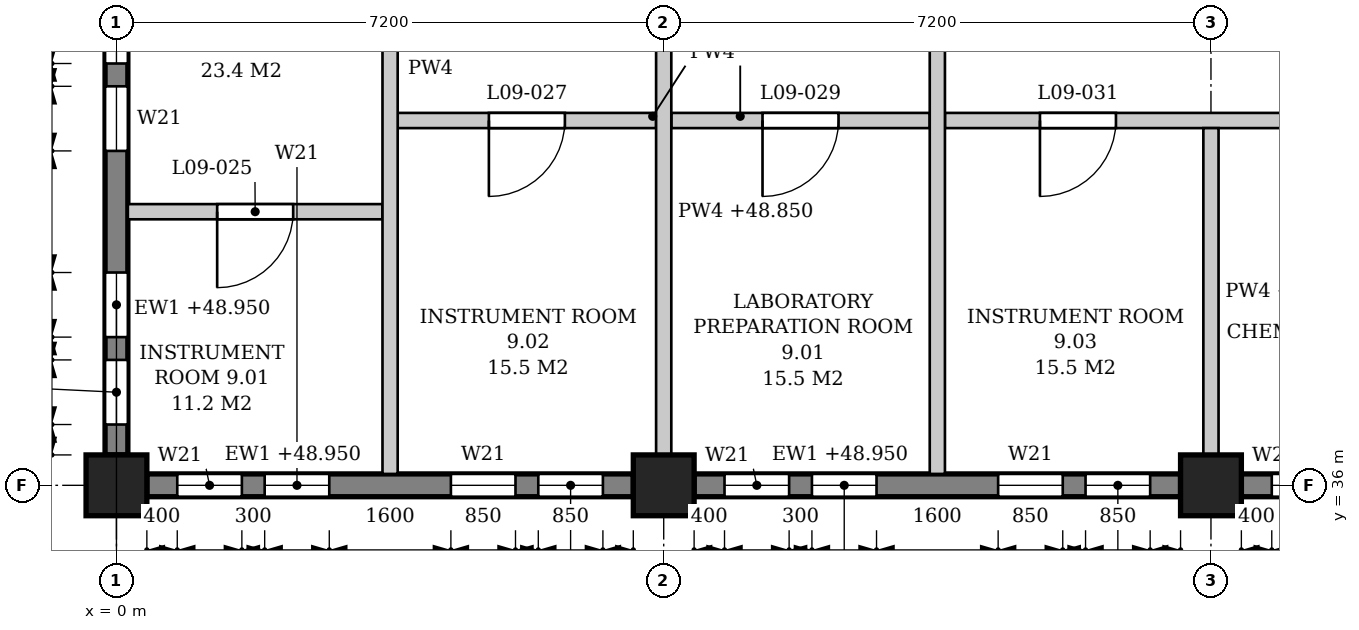
"""IFC4 building model, lengths in metres.
Left out: names, types, materials, properties, quantities, classifications, styles, units other than length and angle.
Written with IfcOpenShell. Run it as: python <this file> out.ifc"""

import sys

from ifc_helpers import new_model, si_unit, direction, frame, frame_2d, origin, origin_2d, place, context, subcontext, project, spatial, polyline, rectangle, outline, extrude, element, fill, save


model = new_model("IFC4")
c1 = context("Model", 3, precision=1e-05, world=origin(), true_north=direction((0.0, 1.0)))
c2 = subcontext(c1, "Body", "Model", "MODEL_VIEW")
j1 = project(units=[si_unit("LENGTHUNIT", "METRE"), si_unit("PLANEANGLEUNIT", "RADIAN")], contexts=[c1])
p1 = place(None, origin())
s1 = spatial("IfcSite", under=j1, at=p1, CompositionType="ELEMENT")
p2 = place(p1, origin())
s2 = spatial("IfcBuilding", under=s1, at=p2, CompositionType="ELEMENT")
p3 = place(p2, frame((0.0, 0.0, 45.3)))
s3 = spatial("IfcBuildingStorey", under=s2, at=p3, CompositionType="ELEMENT", Elevation=45.3)
for number, where, z_axis, x_axis in (
    (1, (0.0, 36.0, 0.0), (0.0, 0.0, 1.0), (1.0, 0.0, 0.0)),
    (2, (7.2, 36.0, 0.0), (0.0, 0.0, 1.0), (1.0, 0.0, 0.0)),
    (3, (14.4, 36.0, 0.0), (0.0, 0.0, 1.0), (1.0, 0.0, 0.0)),
):
    element("IfcColumn", number, at=place(p3, frame(where, z_axis=z_axis, x_axis=x_axis)), inside=s3, PredefinedType="COLUMN", context=c2, shape_type="SweptSolid", body=[
        extrude(rectangle(XDim=0.8, YDim=0.8, at=origin_2d()), origin(), (0.0, 0.0, 1.0), 4.5),
    ])
p4 = place(p3, frame((0.0, 36.4, 0.0), z_axis=(0.0, 0.0, 1.0), x_axis=(0.0, 1.0, 0.0)))
e4 = element("IfcWall", 4, at=p4, inside=s3, PredefinedType="STANDARD", context=c2, shape_type="SweptSolid", body=[
    extrude(rectangle(XDim=6.4, YDim=0.3, at=frame_2d((3.2, 0.0))), origin(), (0.0, 0.0, 1.0), 3.65),
])
p5 = place(p4, frame((0.4, 0.0, 0.9)))
e5 = element("IfcOpeningElement", 5, at=p5, cuts=e4, PredefinedType="OPENING", context=c2, shape_type="SweptSolid", body=[
    extrude(outline(polyline([(0.0, 0.0), (0.85, 0.0), (0.85, 2.25), (0.425, 2.7), (0.0, 2.25), (0.0, 0.0)])), frame((0.0, 0.16, 0.0), z_axis=(0.0, -1.0, 0.0), x_axis=(1.0, 0.0, 0.0)), (0.0, 0.0, 1.0), 0.32),
])
p6 = place(p4, frame((1.55, 0.0, 0.9)))
e6 = element("IfcOpeningElement", 6, at=p6, cuts=e4, PredefinedType="OPENING", context=c2, shape_type="SweptSolid", body=[
    extrude(outline(polyline([(0.0, 0.0), (0.85, 0.0), (0.85, 2.25), (0.425, 2.7), (0.0, 2.25), (0.0, 0.0)])), frame((0.0, 0.16, 0.0), z_axis=(0.0, -1.0, 0.0), x_axis=(1.0, 0.0, 0.0)), (0.0, 0.0, 1.0), 0.32),
])
p7 = place(p4, frame((4.0, 0.0, 0.9)))
e7 = element("IfcOpeningElement", 7, at=p7, cuts=e4, PredefinedType="OPENING", context=c2, shape_type="SweptSolid", body=[
    extrude(outline(polyline([(0.0, 0.0), (0.85, 0.0), (0.85, 2.25), (0.425, 2.7), (0.0, 2.25), (0.0, 0.0)])), frame((0.0, 0.16, 0.0), z_axis=(0.0, -1.0, 0.0), x_axis=(1.0, 0.0, 0.0)), (0.0, 0.0, 1.0), 0.32),
])
p8 = place(p4, frame((5.15, 0.0, 0.9)))
e8 = element("IfcOpeningElement", 8, at=p8, cuts=e4, PredefinedType="OPENING", context=c2, shape_type="SweptSolid", body=[
    extrude(outline(polyline([(0.0, 0.0), (0.85, 0.0), (0.85, 2.25), (0.425, 2.7), (0.0, 2.25), (0.0, 0.0)])), frame((0.0, 0.16, 0.0), z_axis=(0.0, -1.0, 0.0), x_axis=(1.0, 0.0, 0.0)), (0.0, 0.0, 1.0), 0.32),
])
p9 = place(p3, frame((0.4, 36.0, 0.0), z_axis=(0.0, 0.0, 1.0), x_axis=(1.0, 0.0, 0.0)))
e9 = element("IfcWall", 9, at=p9, inside=s3, PredefinedType="STANDARD", context=c2, shape_type="SweptSolid", body=[
    extrude(rectangle(XDim=6.4, YDim=0.3, at=frame_2d((3.2, 0.0))), origin(), (0.0, 0.0, 1.0), 3.65),
])
p10 = place(p9, frame((0.4, 0.0, 0.9)))
e10 = element("IfcOpeningElement", 10, at=p10, cuts=e9, PredefinedType="OPENING", context=c2, shape_type="SweptSolid", body=[
    extrude(outline(polyline([(0.0, 0.0), (0.85, 0.0), (0.85, 2.25), (0.425, 2.7), (0.0, 2.25), (0.0, 0.0)])), frame((0.0, 0.16, 0.0), z_axis=(0.0, -1.0, 0.0), x_axis=(1.0, 0.0, 0.0)), (0.0, 0.0, 1.0), 0.32),
])
p11 = place(p9, frame((1.55, 0.0, 0.9)))
e11 = element("IfcOpeningElement", 11, at=p11, cuts=e9, PredefinedType="OPENING", context=c2, shape_type="SweptSolid", body=[
    extrude(outline(polyline([(0.0, 0.0), (0.85, 0.0), (0.85, 2.25), (0.425, 2.7), (0.0, 2.25), (0.0, 0.0)])), frame((0.0, 0.16, 0.0), z_axis=(0.0, -1.0, 0.0), x_axis=(1.0, 0.0, 0.0)), (0.0, 0.0, 1.0), 0.32),
])
p12 = place(p9, frame((4.0, 0.0, 0.9)))
e12 = element("IfcOpeningElement", 12, at=p12, cuts=e9, PredefinedType="OPENING", context=c2, shape_type="SweptSolid", body=[
    extrude(outline(polyline([(0.0, 0.0), (0.85, 0.0), (0.85, 2.25), (0.425, 2.7), (0.0, 2.25), (0.0, 0.0)])), frame((0.0, 0.16, 0.0), z_axis=(0.0, -1.0, 0.0), x_axis=(1.0, 0.0, 0.0)), (0.0, 0.0, 1.0), 0.32),
])
p13 = place(p9, frame((5.15, 0.0, 0.9)))
e13 = element("IfcOpeningElement", 13, at=p13, cuts=e9, PredefinedType="OPENING", context=c2, shape_type="SweptSolid", body=[
    extrude(outline(polyline([(0.0, 0.0), (0.85, 0.0), (0.85, 2.25), (0.425, 2.7), (0.0, 2.25), (0.0, 0.0)])), frame((0.0, 0.16, 0.0), z_axis=(0.0, -1.0, 0.0), x_axis=(1.0, 0.0, 0.0)), (0.0, 0.0, 1.0), 0.32),
])
p14 = place(p3, frame((7.6, 36.0, 0.0), z_axis=(0.0, 0.0, 1.0), x_axis=(1.0, 0.0, 0.0)))
e14 = element("IfcWall", 14, at=p14, inside=s3, PredefinedType="STANDARD", context=c2, shape_type="SweptSolid", body=[
    extrude(rectangle(XDim=6.4, YDim=0.3, at=frame_2d((3.2, 0.0))), origin(), (0.0, 0.0, 1.0), 3.65),
])
p15 = place(p14, frame((0.4, 0.0, 0.9)))
e15 = element("IfcOpeningElement", 15, at=p15, cuts=e14, PredefinedType="OPENING", context=c2, shape_type="SweptSolid", body=[
    extrude(outline(polyline([(0.0, 0.0), (0.85, 0.0), (0.85, 2.25), (0.425, 2.7), (0.0, 2.25), (0.0, 0.0)])), frame((0.0, 0.16, 0.0), z_axis=(0.0, -1.0, 0.0), x_axis=(1.0, 0.0, 0.0)), (0.0, 0.0, 1.0), 0.32),
])
p16 = place(p14, frame((1.55, 0.0, 0.9)))
e16 = element("IfcOpeningElement", 16, at=p16, cuts=e14, PredefinedType="OPENING", context=c2, shape_type="SweptSolid", body=[
    extrude(outline(polyline([(0.0, 0.0), (0.85, 0.0), (0.85, 2.25), (0.425, 2.7), (0.0, 2.25), (0.0, 0.0)])), frame((0.0, 0.16, 0.0), z_axis=(0.0, -1.0, 0.0), x_axis=(1.0, 0.0, 0.0)), (0.0, 0.0, 1.0), 0.32),
])
p17 = place(p14, frame((4.0, 0.0, 0.9)))
e17 = element("IfcOpeningElement", 17, at=p17, cuts=e14, PredefinedType="OPENING", context=c2, shape_type="SweptSolid", body=[
    extrude(outline(polyline([(0.0, 0.0), (0.85, 0.0), (0.85, 2.25), (0.425, 2.7), (0.0, 2.25), (0.0, 0.0)])), frame((0.0, 0.16, 0.0), z_axis=(0.0, -1.0, 0.0), x_axis=(1.0, 0.0, 0.0)), (0.0, 0.0, 1.0), 0.32),
])
p18 = place(p14, frame((5.15, 0.0, 0.9)))
e18 = element("IfcOpeningElement", 18, at=p18, cuts=e14, PredefinedType="OPENING", context=c2, shape_type="SweptSolid", body=[
    extrude(outline(polyline([(0.0, 0.0), (0.85, 0.0), (0.85, 2.25), (0.425, 2.7), (0.0, 2.25), (0.0, 0.0)])), frame((0.0, 0.16, 0.0), z_axis=(0.0, -1.0, 0.0), x_axis=(1.0, 0.0, 0.0)), (0.0, 0.0, 1.0), 0.32),
])
p19 = place(p3, frame((14.8, 36.0, 0.0), z_axis=(0.0, 0.0, 1.0), x_axis=(1.0, 0.0, 0.0)))
e19 = element("IfcWall", 19, at=p19, inside=s3, PredefinedType="STANDARD", context=c2, shape_type="SweptSolid", body=[
    extrude(rectangle(XDim=6.4, YDim=0.3, at=frame_2d((3.2, 0.0))), origin(), (0.0, 0.0, 1.0), 3.65),
])
p20 = place(p19, frame((0.4, 0.0, 0.9)))
e20 = element("IfcOpeningElement", 20, at=p20, cuts=e19, PredefinedType="OPENING", context=c2, shape_type="SweptSolid", body=[
    extrude(outline(polyline([(0.0, 0.0), (0.85, 0.0), (0.85, 2.25), (0.425, 2.7), (0.0, 2.25), (0.0, 0.0)])), frame((0.0, 0.16, 0.0), z_axis=(0.0, -1.0, 0.0), x_axis=(1.0, 0.0, 0.0)), (0.0, 0.0, 1.0), 0.32),
])
p21 = place(p19, frame((1.55, 0.0, 0.9)))
e21 = element("IfcOpeningElement", 21, at=p21, cuts=e19, PredefinedType="OPENING", context=c2, shape_type="SweptSolid", body=[
    extrude(outline(polyline([(0.0, 0.0), (0.85, 0.0), (0.85, 2.25), (0.425, 2.7), (0.0, 2.25), (0.0, 0.0)])), frame((0.0, 0.16, 0.0), z_axis=(0.0, -1.0, 0.0), x_axis=(1.0, 0.0, 0.0)), (0.0, 0.0, 1.0), 0.32),
])
p22 = place(p19, frame((4.0, 0.0, 0.9)))
e22 = element("IfcOpeningElement", 22, at=p22, cuts=e19, PredefinedType="OPENING", context=c2, shape_type="SweptSolid", body=[
    extrude(outline(polyline([(0.0, 0.0), (0.85, 0.0), (0.85, 2.25), (0.425, 2.7), (0.0, 2.25), (0.0, 0.0)])), frame((0.0, 0.16, 0.0), z_axis=(0.0, -1.0, 0.0), x_axis=(1.0, 0.0, 0.0)), (0.0, 0.0, 1.0), 0.32),
])
p23 = place(p19, frame((5.15, 0.0, 0.9)))
e23 = element("IfcOpeningElement", 23, at=p23, cuts=e19, PredefinedType="OPENING", context=c2, shape_type="SweptSolid", body=[
    extrude(outline(polyline([(0.0, 0.0), (0.85, 0.0), (0.85, 2.25), (0.425, 2.7), (0.0, 2.25), (0.0, 0.0)])), frame((0.0, 0.16, 0.0), z_axis=(0.0, -1.0, 0.0), x_axis=(1.0, 0.0, 0.0)), (0.0, 0.0, 1.0), 0.32),
])
p24 = place(p3, frame((0.15, 39.6, 0.0), z_axis=(0.0, 0.0, 1.0), x_axis=(1.0, 0.0, 0.0)))
e24 = element("IfcWall", 24, at=p24, inside=s3, PredefinedType="PARTITIONING", context=c2, shape_type="SweptSolid", body=[
    extrude(outline(polyline([(0.0, 0.0), (3.35, 0.0), (3.35, 4.25), (0.05, 4.25), (0.05, 3.65), (0.0, 3.65), (0.0, 0.0)])), frame((0.0, 0.1, 0.0), z_axis=(0.0, -1.0, 0.0), x_axis=(1.0, 0.0, 0.0)), (0.0, 0.0, 1.0), 0.2),
])
p25 = place(p24, frame((1.175, 0.0, 0.0)))
e25 = element("IfcOpeningElement", 25, at=p25, cuts=e24, PredefinedType="OPENING", context=c2, shape_type="SweptSolid", body=[
    extrude(rectangle(XDim=1.0, YDim=2.1, at=frame_2d((0.5, 1.05))), frame((0.0, 0.11, 0.0), z_axis=(0.0, -1.0, 0.0), x_axis=(1.0, 0.0, 0.0)), (0.0, 0.0, 1.0), 0.22),
])
p26 = place(p3, frame((3.7, 40.8, 0.0), z_axis=(0.0, 0.0, 1.0), x_axis=(1.0, 0.0, 0.0)))
e26 = element("IfcWall", 26, at=p26, inside=s3, PredefinedType="PARTITIONING", context=c2, shape_type="SweptSolid", body=[
    extrude(outline(polyline([(0.0, 0.0), (3.4, 0.0), (3.4, 3.55), (3.275, 3.55), (3.275, 4.25), (0.0, 4.25), (0.0, 0.0)])), frame((0.0, 0.1, 0.0), z_axis=(0.0, -1.0, 0.0), x_axis=(1.0, 0.0, 0.0)), (0.0, 0.0, 1.0), 0.2),
])
p27 = place(p26, frame((1.2, 0.0, 0.0)))
e27 = element("IfcOpeningElement", 27, at=p27, cuts=e26, PredefinedType="OPENING", context=c2, shape_type="SweptSolid", body=[
    extrude(rectangle(XDim=1.0, YDim=2.1, at=frame_2d((0.5, 1.05))), frame((0.0, 0.11, 0.0), z_axis=(0.0, -1.0, 0.0), x_axis=(1.0, 0.0, 0.0)), (0.0, 0.0, 1.0), 0.22),
])
p28 = place(p3, frame((7.3, 40.8, 0.0), z_axis=(0.0, 0.0, 1.0), x_axis=(1.0, 0.0, 0.0)))
e28 = element("IfcWall", 28, at=p28, inside=s3, PredefinedType="PARTITIONING", context=c2, shape_type="SweptSolid", body=[
    extrude(outline(polyline([(0.0, 0.0), (3.4, 0.0), (3.4, 4.25), (0.125, 4.25), (0.125, 3.55), (0.0, 3.55), (0.0, 0.0)])), frame((0.0, 0.1, 0.0), z_axis=(0.0, -1.0, 0.0), x_axis=(1.0, 0.0, 0.0)), (0.0, 0.0, 1.0), 0.2),
])
p29 = place(p28, frame((1.2, 0.0, 0.0)))
e29 = element("IfcOpeningElement", 29, at=p29, cuts=e28, PredefinedType="OPENING", context=c2, shape_type="SweptSolid", body=[
    extrude(rectangle(XDim=1.0, YDim=2.1, at=frame_2d((0.5, 1.05))), frame((0.0, 0.11, 0.0), z_axis=(0.0, -1.0, 0.0), x_axis=(1.0, 0.0, 0.0)), (0.0, 0.0, 1.0), 0.22),
])
p30 = place(p3, frame((10.9, 40.8, 0.0), z_axis=(0.0, 0.0, 1.0), x_axis=(1.0, 0.0, 0.0)))
e30 = element("IfcWall", 30, at=p30, inside=s3, PredefinedType="PARTITIONING", context=c2, shape_type="SweptSolid", body=[
    extrude(outline(polyline([(0.0, 0.0), (7.0, 0.0), (7.0, 4.25), (3.725, 4.25), (3.725, 3.55), (3.275, 3.55), (3.275, 4.25), (0.0, 4.25), (0.0, 0.0)])), frame((0.0, 0.1, 0.0), z_axis=(0.0, -1.0, 0.0), x_axis=(1.0, 0.0, 0.0)), (0.0, 0.0, 1.0), 0.2),
])
p31 = place(p30, frame((1.25, 0.0, 0.0)))
e31 = element("IfcOpeningElement", 31, at=p31, cuts=e30, PredefinedType="OPENING", context=c2, shape_type="SweptSolid", body=[
    extrude(rectangle(XDim=1.0, YDim=2.1, at=frame_2d((0.5, 1.05))), frame((0.0, 0.11, 0.0), z_axis=(0.0, -1.0, 0.0), x_axis=(1.0, 0.0, 0.0)), (0.0, 0.0, 1.0), 0.22),
])
p32 = place(p30, frame((4.75, 0.0, 0.0)))
e32 = element("IfcOpeningElement", 32, at=p32, cuts=e30, PredefinedType="OPENING", context=c2, shape_type="SweptSolid", body=[
    extrude(rectangle(XDim=1.0, YDim=2.1, at=frame_2d((0.5, 1.05))), frame((0.0, 0.11, 0.0), z_axis=(0.0, -1.0, 0.0), x_axis=(1.0, 0.0, 0.0)), (0.0, 0.0, 1.0), 0.22),
])
p33 = place(p3, frame((3.6, 36.15, 0.0), z_axis=(0.0, 0.0, 1.0), x_axis=(0.0, 1.0, 0.0)))
e33 = element("IfcWall", 33, at=p33, inside=s3, PredefinedType="PARTITIONING", context=c2, shape_type="SweptSolid", body=[
    extrude(outline(polyline([(0.0, 0.0), (10.65, 0.0), (10.65, 4.25), (7.275, 4.25), (7.275, 3.55), (6.825, 3.55), (6.825, 4.25), (0.05, 4.25), (0.05, 3.65), (0.0, 3.65), (0.0, 0.0)])), frame((0.0, 0.1, 0.0), z_axis=(0.0, -1.0, 0.0), x_axis=(1.0, 0.0, 0.0)), (0.0, 0.0, 1.0), 0.2),
])
p34 = place(p3, frame((7.2, 36.4, 0.0), z_axis=(0.0, 0.0, 1.0), x_axis=(0.0, 1.0, 0.0)))
e34 = element("IfcWall", 34, at=p34, inside=s3, PredefinedType="PARTITIONING", context=c2, shape_type="SweptSolid", body=[
    extrude(rectangle(XDim=6.4, YDim=0.2, at=frame_2d((3.2, 0.0))), origin(), (0.0, 0.0, 1.0), 3.55),
])
p35 = place(p3, frame((10.8, 36.15, 0.0), z_axis=(0.0, 0.0, 1.0), x_axis=(0.0, 1.0, 0.0)))
e35 = element("IfcWall", 35, at=p35, inside=s3, PredefinedType="PARTITIONING", context=c2, shape_type="SweptSolid", body=[
    extrude(outline(polyline([(0.0, 0.0), (11.75, 0.0), (11.75, 4.25), (7.275, 4.25), (7.275, 3.55), (6.825, 3.55), (6.825, 4.25), (0.05, 4.25), (0.05, 3.65), (0.0, 3.65), (0.0, 0.0)])), frame((0.0, 0.1, 0.0), z_axis=(0.0, -1.0, 0.0), x_axis=(1.0, 0.0, 0.0)), (0.0, 0.0, 1.0), 0.2),
])
p36 = place(p3, frame((14.4, 36.4, 0.0), z_axis=(0.0, 0.0, 1.0), x_axis=(0.0, 1.0, 0.0)))
e36 = element("IfcWall", 36, at=p36, inside=s3, PredefinedType="PARTITIONING", context=c2, shape_type="SweptSolid", body=[
    extrude(rectangle(XDim=4.3, YDim=0.2, at=frame_2d((2.15, 0.0))), origin(), (0.0, 0.0, 1.0), 3.55),
])
p37 = place(p10, origin())
e37 = element("IfcWindow", 37, at=p37, inside=s3, PartitioningType="SINGLE_PANEL", PredefinedType="WINDOW", context=c2, shape_type="SweptSolid", body=[
    extrude(outline(polyline([(0.0, 0.0), (0.85, 0.0), (0.85, 2.25), (0.425, 2.7), (0.0, 2.25), (0.0, 0.0)])), frame((0.0, 0.03, 0.0), z_axis=(0.0, -1.0, 0.0), x_axis=(1.0, 0.0, 0.0)), (0.0, 0.0, 1.0), 0.06),
])
fill(e10, e37)
p38 = place(p11, origin())
e38 = element("IfcWindow", 38, at=p38, inside=s3, PartitioningType="SINGLE_PANEL", PredefinedType="WINDOW", context=c2, shape_type="SweptSolid", body=[
    extrude(outline(polyline([(0.0, 0.0), (0.85, 0.0), (0.85, 2.25), (0.425, 2.7), (0.0, 2.25), (0.0, 0.0)])), frame((0.0, 0.03, 0.0), z_axis=(0.0, -1.0, 0.0), x_axis=(1.0, 0.0, 0.0)), (0.0, 0.0, 1.0), 0.06),
])
fill(e11, e38)
p39 = place(p12, origin())
e39 = element("IfcWindow", 39, at=p39, inside=s3, PartitioningType="SINGLE_PANEL", PredefinedType="WINDOW", context=c2, shape_type="SweptSolid", body=[
    extrude(outline(polyline([(0.0, 0.0), (0.85, 0.0), (0.85, 2.25), (0.425, 2.7), (0.0, 2.25), (0.0, 0.0)])), frame((0.0, 0.03, 0.0), z_axis=(0.0, -1.0, 0.0), x_axis=(1.0, 0.0, 0.0)), (0.0, 0.0, 1.0), 0.06),
])
fill(e12, e39)
p40 = place(p13, origin())
e40 = element("IfcWindow", 40, at=p40, inside=s3, PartitioningType="SINGLE_PANEL", PredefinedType="WINDOW", context=c2, shape_type="SweptSolid", body=[
    extrude(outline(polyline([(0.0, 0.0), (0.85, 0.0), (0.85, 2.25), (0.425, 2.7), (0.0, 2.25), (0.0, 0.0)])), frame((0.0, 0.03, 0.0), z_axis=(0.0, -1.0, 0.0), x_axis=(1.0, 0.0, 0.0)), (0.0, 0.0, 1.0), 0.06),
])
fill(e13, e40)
p41 = place(p15, origin())
e41 = element("IfcWindow", 41, at=p41, inside=s3, PartitioningType="SINGLE_PANEL", PredefinedType="WINDOW", context=c2, shape_type="SweptSolid", body=[
    extrude(outline(polyline([(0.0, 0.0), (0.85, 0.0), (0.85, 2.25), (0.425, 2.7), (0.0, 2.25), (0.0, 0.0)])), frame((0.0, 0.03, 0.0), z_axis=(0.0, -1.0, 0.0), x_axis=(1.0, 0.0, 0.0)), (0.0, 0.0, 1.0), 0.06),
])
fill(e15, e41)
p42 = place(p16, origin())
e42 = element("IfcWindow", 42, at=p42, inside=s3, PartitioningType="SINGLE_PANEL", PredefinedType="WINDOW", context=c2, shape_type="SweptSolid", body=[
    extrude(outline(polyline([(0.0, 0.0), (0.85, 0.0), (0.85, 2.25), (0.425, 2.7), (0.0, 2.25), (0.0, 0.0)])), frame((0.0, 0.03, 0.0), z_axis=(0.0, -1.0, 0.0), x_axis=(1.0, 0.0, 0.0)), (0.0, 0.0, 1.0), 0.06),
])
fill(e16, e42)
p43 = place(p17, origin())
e43 = element("IfcWindow", 43, at=p43, inside=s3, PartitioningType="SINGLE_PANEL", PredefinedType="WINDOW", context=c2, shape_type="SweptSolid", body=[
    extrude(outline(polyline([(0.0, 0.0), (0.85, 0.0), (0.85, 2.25), (0.425, 2.7), (0.0, 2.25), (0.0, 0.0)])), frame((0.0, 0.03, 0.0), z_axis=(0.0, -1.0, 0.0), x_axis=(1.0, 0.0, 0.0)), (0.0, 0.0, 1.0), 0.06),
])
fill(e17, e43)
p44 = place(p18, origin())
e44 = element("IfcWindow", 44, at=p44, inside=s3, PartitioningType="SINGLE_PANEL", PredefinedType="WINDOW", context=c2, shape_type="SweptSolid", body=[
    extrude(outline(polyline([(0.0, 0.0), (0.85, 0.0), (0.85, 2.25), (0.425, 2.7), (0.0, 2.25), (0.0, 0.0)])), frame((0.0, 0.03, 0.0), z_axis=(0.0, -1.0, 0.0), x_axis=(1.0, 0.0, 0.0)), (0.0, 0.0, 1.0), 0.06),
])
fill(e18, e44)
p45 = place(p20, origin())
e45 = element("IfcWindow", 45, at=p45, inside=s3, PartitioningType="SINGLE_PANEL", PredefinedType="WINDOW", context=c2, shape_type="SweptSolid", body=[
    extrude(outline(polyline([(0.0, 0.0), (0.85, 0.0), (0.85, 2.25), (0.425, 2.7), (0.0, 2.25), (0.0, 0.0)])), frame((0.0, 0.03, 0.0), z_axis=(0.0, -1.0, 0.0), x_axis=(1.0, 0.0, 0.0)), (0.0, 0.0, 1.0), 0.06),
])
fill(e20, e45)
p46 = place(p5, origin())
e46 = element("IfcWindow", 46, at=p46, inside=s3, PartitioningType="SINGLE_PANEL", PredefinedType="WINDOW", context=c2, shape_type="SweptSolid", body=[
    extrude(outline(polyline([(0.0, 0.0), (0.85, 0.0), (0.85, 2.25), (0.425, 2.7), (0.0, 2.25), (0.0, 0.0)])), frame((0.0, 0.03, 0.0), z_axis=(0.0, -1.0, 0.0), x_axis=(1.0, 0.0, 0.0)), (0.0, 0.0, 1.0), 0.06),
])
fill(e5, e46)
p47 = place(p6, origin())
e47 = element("IfcWindow", 47, at=p47, inside=s3, PartitioningType="SINGLE_PANEL", PredefinedType="WINDOW", context=c2, shape_type="SweptSolid", body=[
    extrude(outline(polyline([(0.0, 0.0), (0.85, 0.0), (0.85, 2.25), (0.425, 2.7), (0.0, 2.25), (0.0, 0.0)])), frame((0.0, 0.03, 0.0), z_axis=(0.0, -1.0, 0.0), x_axis=(1.0, 0.0, 0.0)), (0.0, 0.0, 1.0), 0.06),
])
fill(e6, e47)
p48 = place(p7, origin())
e48 = element("IfcWindow", 48, at=p48, inside=s3, PartitioningType="SINGLE_PANEL", PredefinedType="WINDOW", context=c2, shape_type="SweptSolid", body=[
    extrude(outline(polyline([(0.0, 0.0), (0.85, 0.0), (0.85, 2.25), (0.425, 2.7), (0.0, 2.25), (0.0, 0.0)])), frame((0.0, 0.03, 0.0), z_axis=(0.0, -1.0, 0.0), x_axis=(1.0, 0.0, 0.0)), (0.0, 0.0, 1.0), 0.06),
])
fill(e7, e48)
p49 = place(p8, origin())
e49 = element("IfcWindow", 49, at=p49, inside=s3, PartitioningType="SINGLE_PANEL", PredefinedType="WINDOW", context=c2, shape_type="SweptSolid", body=[
    extrude(outline(polyline([(0.0, 0.0), (0.85, 0.0), (0.85, 2.25), (0.425, 2.7), (0.0, 2.25), (0.0, 0.0)])), frame((0.0, 0.03, 0.0), z_axis=(0.0, -1.0, 0.0), x_axis=(1.0, 0.0, 0.0)), (0.0, 0.0, 1.0), 0.06),
])
fill(e8, e49)
p50 = place(p25, frame((1.0, 0.0, 0.0), z_axis=(0.0, 0.0, 1.0), x_axis=(-1.0, 0.0, 0.0)))
e50 = element("IfcDoor", 50, at=p50, inside=s3, OperationType="SINGLE_SWING_RIGHT", PredefinedType="DOOR", context=c2, shape_type="SweptSolid", body=[
    extrude(rectangle(XDim=1.0, YDim=2.1, at=frame_2d((0.5, 1.05))), frame((0.0, 0.025, 0.0), z_axis=(0.0, -1.0, 0.0), x_axis=(1.0, 0.0, 0.0)), (0.0, 0.0, 1.0), 0.05),
])
fill(e25, e50)
p51 = place(p27, frame((1.0, 0.0, 0.0), z_axis=(0.0, 0.0, 1.0), x_axis=(-1.0, 0.0, 0.0)))
e51 = element("IfcDoor", 51, at=p51, inside=s3, OperationType="SINGLE_SWING_RIGHT", PredefinedType="DOOR", context=c2, shape_type="SweptSolid", body=[
    extrude(rectangle(XDim=1.0, YDim=2.1, at=frame_2d((0.5, 1.05))), frame((0.0, 0.025, 0.0), z_axis=(0.0, -1.0, 0.0), x_axis=(1.0, 0.0, 0.0)), (0.0, 0.0, 1.0), 0.05),
])
fill(e27, e51)
p52 = place(p29, frame((1.0, 0.0, 0.0), z_axis=(0.0, 0.0, 1.0), x_axis=(-1.0, 0.0, 0.0)))
e52 = element("IfcDoor", 52, at=p52, inside=s3, OperationType="SINGLE_SWING_RIGHT", PredefinedType="DOOR", context=c2, shape_type="SweptSolid", body=[
    extrude(rectangle(XDim=1.0, YDim=2.1, at=frame_2d((0.5, 1.05))), frame((0.0, 0.025, 0.0), z_axis=(0.0, -1.0, 0.0), x_axis=(1.0, 0.0, 0.0)), (0.0, 0.0, 1.0), 0.05),
])
fill(e29, e52)
p53 = place(p31, frame((1.0, 0.0, 0.0), z_axis=(0.0, 0.0, 1.0), x_axis=(-1.0, 0.0, 0.0)))
e53 = element("IfcDoor", 53, at=p53, inside=s3, OperationType="SINGLE_SWING_RIGHT", PredefinedType="DOOR", context=c2, shape_type="SweptSolid", body=[
    extrude(rectangle(XDim=1.0, YDim=2.1, at=frame_2d((0.5, 1.05))), frame((0.0, 0.025, 0.0), z_axis=(0.0, -1.0, 0.0), x_axis=(1.0, 0.0, 0.0)), (0.0, 0.0, 1.0), 0.05),
])
fill(e31, e53)
save(model, sys.argv[1])
